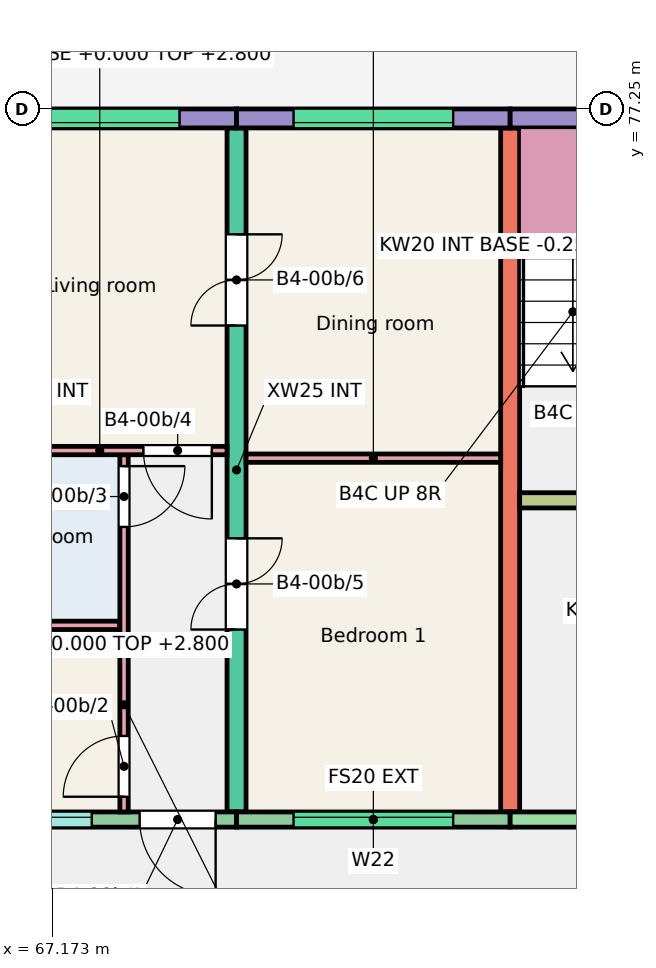
"""IFC4 building model, lengths in metres.
Left out: names, types, materials, properties, quantities, classifications, styles, units other than length and angle.
Written with IfcOpenShell. Run it as: python <this file> out.ifc"""

import sys

from ifc_helpers import new_model, si_unit, direction, frame, frame_2d, origin, place, context, subcontext, project, spatial, rectangle, extrude, element, fill, save


model = new_model("IFC4")
c1 = context("Model", 3, precision=1e-05, world=origin(), true_north=direction((0.0, 1.0)))
c2 = subcontext(c1, "Body", "Model", "MODEL_VIEW")
j1 = project(units=[si_unit("LENGTHUNIT", "METRE"), si_unit("PLANEANGLEUNIT", "RADIAN")], contexts=[c1])
p1 = place(None, origin())
s1 = spatial("IfcSite", under=j1, at=p1, CompositionType="ELEMENT")
p2 = place(p1, origin())
s2 = spatial("IfcBuilding", under=s1, at=p2, CompositionType="ELEMENT")
p3 = place(p2, origin())
s3 = spatial("IfcBuildingStorey", under=s2, at=p3, CompositionType="ELEMENT", Elevation=0.0)
p4 = place(p3, frame((69.6, 68.0, -0.25), z_axis=(0.0, 0.0, 1.0), x_axis=(0.0, 1.0, 0.0)))
e1 = element("IfcWall", 1, at=p4, inside=s3, PredefinedType="SHEAR", context=c2, shape_type="SweptSolid", body=[
    extrude(rectangle(XDim=9.0, YDim=0.25, at=frame_2d((4.5, 0.0))), origin(), (0.0, 0.0, 1.0), 3.25),
])
p5 = place(p4, frame((2.4, 0.0, 0.25)))
e2 = element("IfcOpeningElement", 2, at=p5, cuts=e1, PredefinedType="OPENING", context=c2, shape_type="SweptSolid", body=[
    extrude(rectangle(XDim=1.2, YDim=2.1, at=frame_2d((0.6, 1.05))), frame((0.0, 0.135, 0.0), z_axis=(0.0, -1.0, 0.0), x_axis=(1.0, 0.0, 0.0)), (0.0, 0.0, 1.0), 0.27),
])
p6 = place(p4, frame((6.4, 0.0, 0.25)))
e3 = element("IfcOpeningElement", 3, at=p6, cuts=e1, PredefinedType="OPENING", context=c2, shape_type="SweptSolid", body=[
    extrude(rectangle(XDim=1.2, YDim=2.1, at=frame_2d((0.6, 1.05))), frame((0.0, 0.135, 0.0), z_axis=(0.0, -1.0, 0.0), x_axis=(1.0, 0.0, 0.0)), (0.0, 0.0, 1.0), 0.27),
])
p7 = place(p3, frame((73.2, 68.0, -0.25), z_axis=(0.0, 0.0, 1.0), x_axis=(0.0, 1.0, 0.0)))
e4 = element("IfcWall", 4, at=p7, inside=s3, PredefinedType="SHEAR", context=c2, shape_type="SweptSolid", body=[
    extrude(rectangle(XDim=9.0, YDim=0.25, at=frame_2d((4.5, 0.0))), origin(), (0.0, 0.0, 1.0), 3.25),
])
p8 = place(p3, frame((66.0, 77.125, -0.25), z_axis=(0.0, 0.0, 1.0), x_axis=(1.0, 0.0, 0.0)))
e5 = element("IfcWall", 5, at=p8, inside=s3, PredefinedType="SOLIDWALL", context=c2, shape_type="SweptSolid", body=[
    extrude(rectangle(XDim=3.6, YDim=0.25, at=frame_2d((1.8, 0.0))), origin(), (0.0, 0.0, 1.0), 3.25),
])
p9 = place(p8, frame((0.75, 0.0, 1.45)))
e6 = element("IfcOpeningElement", 6, at=p9, cuts=e5, PredefinedType="OPENING", context=c2, shape_type="SweptSolid", body=[
    extrude(rectangle(XDim=2.1, YDim=1.2, at=frame_2d((1.05, 0.6))), frame((0.0, 0.135, 0.0), z_axis=(0.0, -1.0, 0.0), x_axis=(1.0, 0.0, 0.0)), (0.0, 0.0, 1.0), 0.27),
])
p10 = place(p3, frame((66.0, 67.9, -0.25), z_axis=(0.0, 0.0, 1.0), x_axis=(1.0, 0.0, 0.0)))
e7 = element("IfcWall", 7, at=p10, inside=s3, PredefinedType="SOLIDWALL", context=c2, shape_type="SweptSolid", body=[
    extrude(rectangle(XDim=3.6, YDim=0.2, at=frame_2d((1.8, 0.0))), origin(), (0.0, 0.0, 1.0), 3.25),
])
p11 = place(p10, frame((0.495, 0.0, 1.35)))
e8 = element("IfcOpeningElement", 8, at=p11, cuts=e7, PredefinedType="OPENING", context=c2, shape_type="SweptSolid", body=[
    extrude(rectangle(XDim=1.2, YDim=1.3, at=frame_2d((0.6, 0.65))), frame((0.0, 0.11, 0.0), z_axis=(0.0, -1.0, 0.0), x_axis=(1.0, 0.0, 0.0)), (0.0, 0.0, 1.0), 0.22),
])
p12 = place(p10, frame((2.325, 0.0, 0.25)))
e9 = element("IfcOpeningElement", 9, at=p12, cuts=e7, PredefinedType="OPENING", context=c2, shape_type="SweptSolid", body=[
    extrude(rectangle(XDim=1.0, YDim=2.1, at=frame_2d((0.5, 1.05))), frame((0.0, 0.11, 0.0), z_axis=(0.0, -1.0, 0.0), x_axis=(1.0, 0.0, 0.0)), (0.0, 0.0, 1.0), 0.22),
])
p13 = place(p3, frame((69.6, 77.125, -0.25), z_axis=(0.0, 0.0, 1.0), x_axis=(1.0, 0.0, 0.0)))
e10 = element("IfcWall", 10, at=p13, inside=s3, PredefinedType="SOLIDWALL", context=c2, shape_type="SweptSolid", body=[
    extrude(rectangle(XDim=3.6, YDim=0.25, at=frame_2d((1.8, 0.0))), origin(), (0.0, 0.0, 1.0), 3.25),
])
p14 = place(p13, frame((0.75, 0.0, 1.45)))
e11 = element("IfcOpeningElement", 11, at=p14, cuts=e10, PredefinedType="OPENING", context=c2, shape_type="SweptSolid", body=[
    extrude(rectangle(XDim=2.1, YDim=1.2, at=frame_2d((1.05, 0.6))), frame((0.0, 0.135, 0.0), z_axis=(0.0, -1.0, 0.0), x_axis=(1.0, 0.0, 0.0)), (0.0, 0.0, 1.0), 0.27),
])
p15 = place(p3, frame((69.6, 67.9, -0.25), z_axis=(0.0, 0.0, 1.0), x_axis=(1.0, 0.0, 0.0)))
e12 = element("IfcWall", 12, at=p15, inside=s3, PredefinedType="SOLIDWALL", context=c2, shape_type="SweptSolid", body=[
    extrude(rectangle(XDim=3.6, YDim=0.2, at=frame_2d((1.8, 0.0))), origin(), (0.0, 0.0, 1.0), 3.25),
])
p16 = place(p15, frame((0.75, 0.0, 1.45)))
e13 = element("IfcOpeningElement", 13, at=p16, cuts=e12, PredefinedType="OPENING", context=c2, shape_type="SweptSolid", body=[
    extrude(rectangle(XDim=2.1, YDim=1.2, at=frame_2d((1.05, 0.6))), frame((0.0, 0.11, 0.0), z_axis=(0.0, -1.0, 0.0), x_axis=(1.0, 0.0, 0.0)), (0.0, 0.0, 1.0), 0.22),
])
p17 = place(p3, frame((73.2, 77.125, -0.25), z_axis=(0.0, 0.0, 1.0), x_axis=(1.0, 0.0, 0.0)))
e14 = element("IfcWall", 14, at=p17, inside=s3, PredefinedType="SOLIDWALL", context=c2, shape_type="SweptSolid", body=[
    extrude(rectangle(XDim=6.0, YDim=0.25, at=frame_2d((3.0, 0.0))), origin(), (0.0, 0.0, 1.0), 3.25),
])
p18 = place(p17, frame((1.025, 0.0, 0.25)))
e15 = element("IfcOpeningElement", 15, at=p18, cuts=e14, PredefinedType="OPENING", context=c2, shape_type="SweptSolid", body=[
    extrude(rectangle(XDim=1.1, YDim=2.1, at=frame_2d((0.55, 1.05))), frame((0.0, 0.135, 0.0), z_axis=(0.0, -1.0, 0.0), x_axis=(1.0, 0.0, 0.0)), (0.0, 0.0, 1.0), 0.27),
])
p19 = place(p3, frame((73.2, 67.9, -0.25), z_axis=(0.0, 0.0, 1.0), x_axis=(1.0, 0.0, 0.0)))
e16 = element("IfcWall", 16, at=p19, inside=s3, PredefinedType="SHEAR", context=c2, shape_type="SweptSolid", body=[
    extrude(rectangle(XDim=5.85, YDim=0.2, at=frame_2d((2.925, 0.0))), origin(), (0.0, 0.0, 1.0), 3.25),
])
p20 = place(p19, frame((2.438, 0.0, 0.25)))
e17 = element("IfcOpeningElement", 17, at=p20, cuts=e16, PredefinedType="OPENING", context=c2, shape_type="SweptSolid", body=[
    extrude(rectangle(XDim=1.1, YDim=2.1, at=frame_2d((0.55, 1.05))), frame((0.0, 0.11, 0.0), z_axis=(0.0, -1.0, 0.0), x_axis=(1.0, 0.0, 0.0)), (0.0, 0.0, 1.0), 0.22),
])
p21 = place(p3, frame((73.325, 72.1, -0.25), z_axis=(0.0, 0.0, 1.0), x_axis=(1.0, 0.0, 0.0)))
e18 = element("IfcWall", 18, at=p21, inside=s3, PredefinedType="SHEAR", context=c2, shape_type="SweptSolid", body=[
    extrude(rectangle(XDim=5.725, YDim=0.2, at=frame_2d((2.863, 0.0))), origin(), (0.0, 0.0, 1.0), 3.25),
])
p22 = place(p21, frame((0.95, 0.0, 0.25)))
e19 = element("IfcOpeningElement", 19, at=p22, cuts=e18, PredefinedType="OPENING", context=c2, shape_type="SweptSolid", body=[
    extrude(rectangle(XDim=1.0, YDim=2.1, at=frame_2d((0.5, 1.05))), frame((0.0, 0.11, 0.0), z_axis=(0.0, -1.0, 0.0), x_axis=(1.0, 0.0, 0.0)), (0.0, 0.0, 1.0), 0.22),
])
p23 = place(p21, frame((3.863, 0.0, 0.25)))
e20 = element("IfcOpeningElement", 20, at=p23, cuts=e18, PredefinedType="OPENING", context=c2, shape_type="SweptSolid", body=[
    extrude(rectangle(XDim=1.1, YDim=2.1, at=frame_2d((0.55, 1.05))), frame((0.0, 0.11, 0.0), z_axis=(0.0, -1.0, 0.0), x_axis=(1.0, 0.0, 0.0)), (0.0, 0.0, 1.0), 0.22),
])
p24 = place(p3, frame((66.125, 70.455, 0.0), z_axis=(0.0, 0.0, 1.0), x_axis=(1.0, 0.0, 0.0)))
e21 = element("IfcWall", 21, at=p24, inside=s3, PredefinedType="PARTITIONING", context=c2, shape_type="SweptSolid", body=[
    extrude(rectangle(XDim=1.94, YDim=0.11, at=frame_2d((0.97, 0.0))), origin(), (0.0, 0.0, 1.0), 2.8),
])
p25 = place(p3, frame((68.12, 68.0, 0.0), z_axis=(0.0, 0.0, 1.0), x_axis=(0.0, 1.0, 0.0)))
e22 = element("IfcWall", 22, at=p25, inside=s3, PredefinedType="PARTITIONING", context=c2, shape_type="SweptSolid", body=[
    extrude(rectangle(XDim=4.7, YDim=0.11, at=frame_2d((2.35, 0.0))), origin(), (0.0, 0.0, 1.0), 2.8),
])
p26 = place(p25, frame((0.2, 0.0, 0.0)))
e23 = element("IfcOpeningElement", 23, at=p26, cuts=e22, PredefinedType="OPENING", context=c2, shape_type="SweptSolid", body=[
    extrude(rectangle(XDim=0.8, YDim=2.1, at=frame_2d((0.4, 1.05))), frame((0.0, 0.065, 0.0), z_axis=(0.0, -1.0, 0.0), x_axis=(1.0, 0.0, 0.0)), (0.0, 0.0, 1.0), 0.13),
])
p27 = place(p25, frame((3.75, 0.0, 0.0)))
e24 = element("IfcOpeningElement", 24, at=p27, cuts=e22, PredefinedType="OPENING", context=c2, shape_type="SweptSolid", body=[
    extrude(rectangle(XDim=0.8, YDim=2.1, at=frame_2d((0.4, 1.05))), frame((0.0, 0.065, 0.0), z_axis=(0.0, -1.0, 0.0), x_axis=(1.0, 0.0, 0.0)), (0.0, 0.0, 1.0), 0.13),
])
p28 = place(p3, frame((66.125, 72.755, 0.0), z_axis=(0.0, 0.0, 1.0), x_axis=(1.0, 0.0, 0.0)))
e25 = element("IfcWall", 25, at=p28, inside=s3, PredefinedType="PARTITIONING", context=c2, shape_type="SweptSolid", body=[
    extrude(rectangle(XDim=3.35, YDim=0.11, at=frame_2d((1.675, 0.0))), origin(), (0.0, 0.0, 1.0), 2.8),
])
p29 = place(p28, frame((2.25, 0.0, 0.0)))
e26 = element("IfcOpeningElement", 26, at=p29, cuts=e25, PredefinedType="OPENING", context=c2, shape_type="SweptSolid", body=[
    extrude(rectangle(XDim=0.9, YDim=2.1, at=frame_2d((0.45, 1.05))), frame((0.0, 0.065, 0.0), z_axis=(0.0, -1.0, 0.0), x_axis=(1.0, 0.0, 0.0)), (0.0, 0.0, 1.0), 0.13),
])
p30 = place(p3, frame((69.725, 72.655, 0.0), z_axis=(0.0, 0.0, 1.0), x_axis=(1.0, 0.0, 0.0)))
e27 = element("IfcWall", 27, at=p30, inside=s3, PredefinedType="PARTITIONING", context=c2, shape_type="SweptSolid", body=[
    extrude(rectangle(XDim=3.35, YDim=0.11, at=frame_2d((1.675, 0.0))), origin(), (0.0, 0.0, 1.0), 2.8),
])
p31 = place(p16, origin())
e28 = element("IfcWindow", 28, at=p31, inside=s3, PartitioningType="SINGLE_PANEL", PredefinedType="WINDOW", context=c2, shape_type="SweptSolid", body=[
    extrude(rectangle(XDim=2.1, YDim=1.2, at=frame_2d((1.05, 0.6))), frame((0.0, 0.06, 0.0), z_axis=(0.0, -1.0, 0.0), x_axis=(1.0, 0.0, 0.0)), (0.0, 0.0, 1.0), 0.06),
])
fill(e13, e28)
p32 = place(p14, origin())
e29 = element("IfcWindow", 29, at=p32, inside=s3, PartitioningType="SINGLE_PANEL", PredefinedType="WINDOW", context=c2, shape_type="SweptSolid", body=[
    extrude(rectangle(XDim=2.1, YDim=1.2, at=frame_2d((1.05, 0.6))), frame((0.0, -0.025, 0.0), z_axis=(0.0, -1.0, 0.0), x_axis=(1.0, 0.0, 0.0)), (0.0, 0.0, 1.0), 0.06),
])
fill(e11, e29)
p33 = place(p11, origin())
e30 = element("IfcWindow", 30, at=p33, inside=s3, PartitioningType="SINGLE_PANEL", PredefinedType="WINDOW", context=c2, shape_type="SweptSolid", body=[
    extrude(rectangle(XDim=1.2, YDim=1.3, at=frame_2d((0.6, 0.65))), frame((0.0, 0.06, 0.0), z_axis=(0.0, -1.0, 0.0), x_axis=(1.0, 0.0, 0.0)), (0.0, 0.0, 1.0), 0.06),
])
fill(e8, e30)
p34 = place(p9, origin())
e31 = element("IfcWindow", 31, at=p34, inside=s3, PartitioningType="SINGLE_PANEL", PredefinedType="WINDOW", context=c2, shape_type="SweptSolid", body=[
    extrude(rectangle(XDim=2.1, YDim=1.2, at=frame_2d((1.05, 0.6))), frame((0.0, -0.025, 0.0), z_axis=(0.0, -1.0, 0.0), x_axis=(1.0, 0.0, 0.0)), (0.0, 0.0, 1.0), 0.06),
])
fill(e6, e31)
p35 = place(p12, origin())
e32 = element("IfcDoor", 32, at=p35, inside=s3, OperationType="SINGLE_SWING_RIGHT", PredefinedType="DOOR", context=c2, shape_type="SweptSolid", body=[
    extrude(rectangle(XDim=1.0, YDim=2.1, at=frame_2d((0.5, 1.05))), frame((0.0, 0.025, 0.0), z_axis=(0.0, -1.0, 0.0), x_axis=(1.0, 0.0, 0.0)), (0.0, 0.0, 1.0), 0.05),
])
fill(e9, e32)
p36 = place(p26, origin())
e33 = element("IfcDoor", 33, at=p36, inside=s3, OperationType="SINGLE_SWING_LEFT", PredefinedType="DOOR", context=c2, shape_type="SweptSolid", body=[
    extrude(rectangle(XDim=0.8, YDim=2.1, at=frame_2d((0.4, 1.05))), frame((0.0, 0.025, 0.0), z_axis=(0.0, -1.0, 0.0), x_axis=(1.0, 0.0, 0.0)), (0.0, 0.0, 1.0), 0.05),
])
fill(e23, e33)
p37 = place(p27, origin())
e34 = element("IfcDoor", 34, at=p37, inside=s3, OperationType="SINGLE_SWING_RIGHT", PredefinedType="DOOR", context=c2, shape_type="SweptSolid", body=[
    extrude(rectangle(XDim=0.8, YDim=2.1, at=frame_2d((0.4, 1.05))), frame((0.0, 0.025, 0.0), z_axis=(0.0, -1.0, 0.0), x_axis=(1.0, 0.0, 0.0)), (0.0, 0.0, 1.0), 0.05),
])
fill(e24, e34)
p38 = place(p29, origin())
e35 = element("IfcDoor", 35, at=p38, inside=s3, OperationType="SINGLE_SWING_RIGHT", PredefinedType="DOOR", context=c2, shape_type="SweptSolid", body=[
    extrude(rectangle(XDim=0.9, YDim=2.1, at=frame_2d((0.45, 1.05))), frame((0.0, 0.025, 0.0), z_axis=(0.0, -1.0, 0.0), x_axis=(1.0, 0.0, 0.0)), (0.0, 0.0, 1.0), 0.05),
])
fill(e26, e35)
p39 = place(p5, origin())
e36 = element("IfcDoor", 36, at=p39, inside=s3, OperationType="DOUBLE_DOOR_SINGLE_SWING", PredefinedType="DOOR", context=c2, shape_type="SweptSolid", body=[
    extrude(rectangle(XDim=1.2, YDim=2.1, at=frame_2d((0.6, 1.05))), frame((0.0, 0.025, 0.0), z_axis=(0.0, -1.0, 0.0), x_axis=(1.0, 0.0, 0.0)), (0.0, 0.0, 1.0), 0.05),
])
fill(e2, e36)
p40 = place(p6, origin())
e37 = element("IfcDoor", 37, at=p40, inside=s3, OperationType="DOUBLE_DOOR_SINGLE_SWING", PredefinedType="DOOR", context=c2, shape_type="SweptSolid", body=[
    extrude(rectangle(XDim=1.2, YDim=2.1, at=frame_2d((0.6, 1.05))), frame((0.0, 0.025, 0.0), z_axis=(0.0, -1.0, 0.0), x_axis=(1.0, 0.0, 0.0)), (0.0, 0.0, 1.0), 0.05),
])
fill(e3, e37)
save(model, sys.argv[1])
